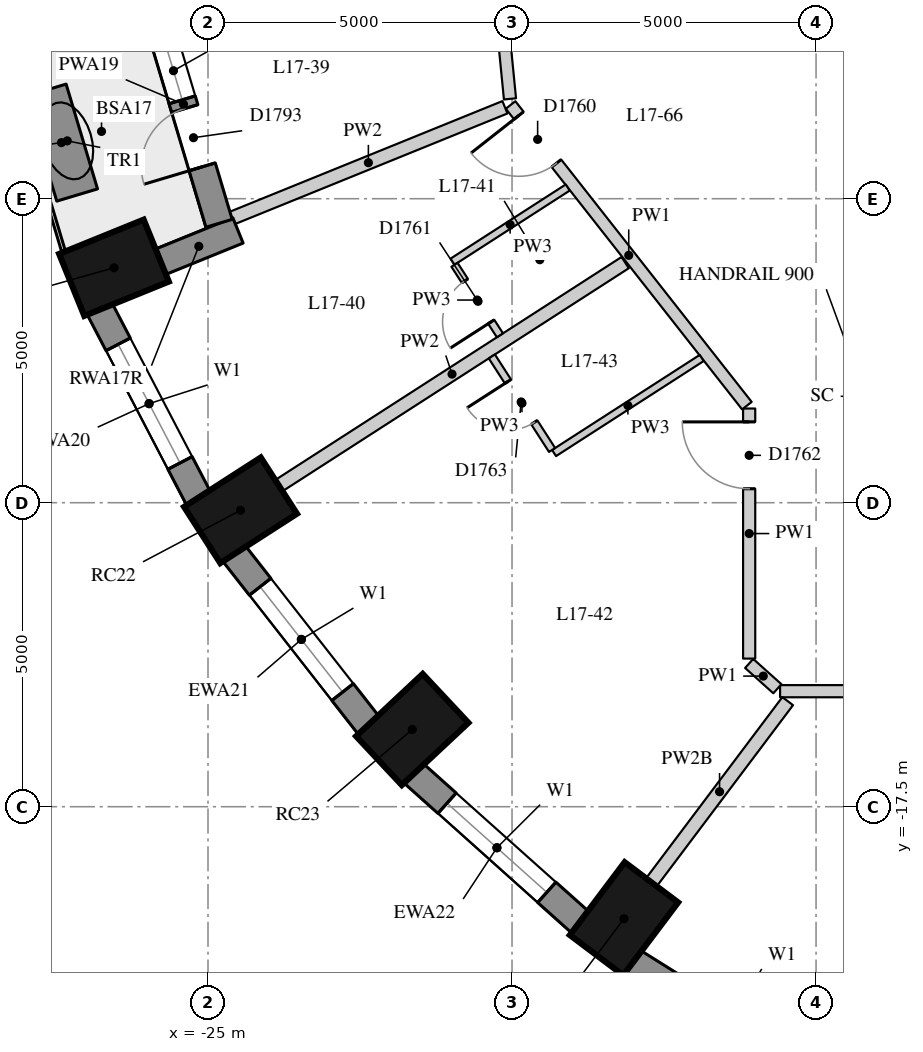
"""IFC4 building model, lengths in metres.
Left out: names, types, materials, properties, quantities, classifications, styles, units other than length and angle.
Written with IfcOpenShell. Run it as: python <this file> out.ifc"""

import sys

from ifc_helpers import new_model, si_unit, direction, frame, frame_2d, origin, origin_2d, place, context, subcontext, project, spatial, rectangle, extrude, element, fill, save


model = new_model("IFC4")
c1 = context("Model", 3, precision=1e-05, world=origin(), true_north=direction((0.0, 1.0)))
c2 = subcontext(c1, "Body", "Model", "MODEL_VIEW")
j1 = project(units=[si_unit("LENGTHUNIT", "METRE"), si_unit("PLANEANGLEUNIT", "RADIAN")], contexts=[c1])
p1 = place(None, origin())
s1 = spatial("IfcSite", under=j1, at=p1, CompositionType="ELEMENT")
p2 = place(p1, origin())
s2 = spatial("IfcBuilding", under=s1, at=p2, CompositionType="ELEMENT")
p3 = place(p2, frame((0.0, 0.0, 64.6)))
s3 = spatial("IfcBuildingStorey", under=s2, at=p3, CompositionType="ELEMENT", Elevation=64.6)
for number, where, z_axis, x_axis in (
    (1, (-26.546, -8.636, 0.0), (0.0, 0.0, 1.0), (-0.927, -0.376, 0.0)),
    (2, (-24.465, -12.625, 0.0), (0.0, 0.0, 1.0), (-0.841, -0.541, 0.0)),
    (3, (-21.641, -16.23, 0.0), (0.0, 0.0, 1.0), (-0.73, -0.683, 0.0)),
    (4, (-18.159, -19.343, 0.0), (0.0, 0.0, 1.0), (-0.601, -0.799, 0.0)),
):
    element("IfcColumn", number, at=place(p3, frame(where, z_axis=z_axis, x_axis=x_axis)), inside=s3, PredefinedType="COLUMN", context=c2, shape_type="SweptSolid", body=[
        extrude(rectangle(XDim=1.5, YDim=1.1, at=origin_2d()), origin(), (0.0, 0.0, 1.0), 3.3),
    ])
p4 = place(p3, frame((-26.786, -9.305, 0.0), z_axis=(0.0, 0.0, 1.0), x_axis=(0.462492775226, -0.886623050041, 0.0)))
e5 = element("IfcWall", 5, at=p4, inside=s3, PredefinedType="SOLIDWALL", context=c2, shape_type="SweptSolid", body=[
    extrude(rectangle(XDim=3.532, YDim=0.45, at=frame_2d((1.766, 0.0))), origin(), (0.0, 0.0, 1.0), 3.02),
])
p5 = place(p4, frame((0.666, 0.0, 0.4)))
e6 = element("IfcOpeningElement", 6, at=p5, cuts=e5, PredefinedType="OPENING", context=c2, shape_type="SweptSolid", body=[
    extrude(rectangle(XDim=2.2, YDim=1.75, at=frame_2d((1.1, 0.875))), frame((0.0, 0.235, 0.0), z_axis=(0.0, -1.0, 0.0), x_axis=(1.0, 0.0, 0.0)), (0.0, 0.0, 1.0), 0.47),
])
p6 = place(p3, frame((-24.578, -13.328, 0.0), z_axis=(0.0, 0.0, 1.0), x_axis=(0.616661975264, -0.787228053529, 0.0)))
e7 = element("IfcWall", 7, at=p6, inside=s3, PredefinedType="SOLIDWALL", context=c2, shape_type="SweptSolid", body=[
    extrude(rectangle(XDim=3.61, YDim=0.45, at=frame_2d((1.805, 0.0))), origin(), (0.0, 0.0, 1.0), 3.02),
])
p7 = place(p6, frame((0.705, 0.0, 0.4)))
e8 = element("IfcOpeningElement", 8, at=p7, cuts=e7, PredefinedType="OPENING", context=c2, shape_type="SweptSolid", body=[
    extrude(rectangle(XDim=2.2, YDim=1.75, at=frame_2d((1.1, 0.875))), frame((0.0, 0.235, 0.0), z_axis=(0.0, -1.0, 0.0), x_axis=(1.0, 0.0, 0.0)), (0.0, 0.0, 1.0), 0.47),
])
p8 = place(p3, frame((-21.627, -16.943, 0.0), z_axis=(0.0, 0.0, 1.0), x_axis=(0.745526233716, -0.66647628228, 0.0)))
e9 = element("IfcWall", 9, at=p8, inside=s3, PredefinedType="SOLIDWALL", context=c2, shape_type="SweptSolid", body=[
    extrude(rectangle(XDim=3.697, YDim=0.45, at=frame_2d((1.848, 0.0))), origin(), (0.0, 0.0, 1.0), 3.02),
])
p9 = place(p8, frame((0.749, 0.0, 0.4)))
e10 = element("IfcOpeningElement", 10, at=p9, cuts=e9, PredefinedType="OPENING", context=c2, shape_type="SweptSolid", body=[
    extrude(rectangle(XDim=2.2, YDim=1.75, at=frame_2d((1.1, 0.875))), frame((0.0, 0.235, 0.0), z_axis=(0.0, -1.0, 0.0), x_axis=(1.0, 0.0, 0.0)), (0.0, 0.0, 1.0), 0.47),
])
p10 = place(p3, frame((-18.023, -20.044, 0.0), z_axis=(0.0, 0.0, 1.0), x_axis=(0.847635480093, -0.530579016629, 0.0)))
e11 = element("IfcWall", 11, at=p10, inside=s3, PredefinedType="SOLIDWALL", context=c2, shape_type="SweptSolid", body=[
    extrude(rectangle(XDim=3.782, YDim=0.45, at=frame_2d((1.891, 0.0))), origin(), (0.0, 0.0, 1.0), 3.02),
])
p11 = place(p10, frame((0.791, 0.0, 0.4)))
e12 = element("IfcOpeningElement", 12, at=p11, cuts=e11, PredefinedType="OPENING", context=c2, shape_type="SweptSolid", body=[
    extrude(rectangle(XDim=2.2, YDim=1.75, at=frame_2d((1.1, 0.875))), frame((0.0, 0.235, 0.0), z_axis=(0.0, -1.0, 0.0), x_axis=(1.0, 0.0, 0.0)), (0.0, 0.0, 1.0), 0.47),
])
p12 = place(p3, frame((-25.796, -8.544, 0.0), z_axis=(0.0, 0.0, 1.0), x_axis=(0.926575599743, 0.376108572039, 0.0)))
e13 = element("IfcWall", 13, at=p12, inside=s3, PredefinedType="SOLIDWALL", context=c2, shape_type="SweptSolid", body=[
    extrude(rectangle(XDim=1.39, YDim=0.45, at=frame_2d((0.695, 0.0))), origin(), (0.0, 0.0, 1.0), 3.02),
])
p13 = place(p3, frame((-25.989, -3.987, 0.0), z_axis=(0.0, 0.0, 1.0), x_axis=(0.286427456555, -0.958101932015, 0.0)))
e14 = element("IfcWall", 14, at=p13, inside=s3, PredefinedType="SOLIDWALL", context=c2, shape_type="SweptSolid", body=[
    extrude(rectangle(XDim=4.089, YDim=0.45, at=frame_2d((2.044, 0.0))), origin(), (0.0, 0.0, 1.0), 3.02),
])
p14 = place(p13, frame((0.969, 0.0, 0.4)))
e15 = element("IfcOpeningElement", 15, at=p14, cuts=e14, PredefinedType="OPENING", context=c2, shape_type="SweptSolid", body=[
    extrude(rectangle(XDim=1.0, YDim=1.75, at=frame_2d((0.5, 0.875))), frame((0.0, 0.235, 0.0), z_axis=(0.0, -1.0, 0.0), x_axis=(1.0, 0.0, 0.0)), (0.0, 0.0, 1.0), 0.47),
])
p15 = place(p13, frame((2.119, 0.0, 0.0)))
e16 = element("IfcOpeningElement", 16, at=p15, cuts=e14, PredefinedType="OPENING", context=c2, shape_type="SweptSolid", body=[
    extrude(rectangle(XDim=1.0, YDim=2.15, at=frame_2d((0.5, 1.075))), frame((0.0, 0.235, 0.0), z_axis=(0.0, -1.0, 0.0), x_axis=(1.0, 0.0, 0.0)), (0.0, 0.0, 1.0), 0.47),
])
p16 = place(p3, frame((-27.669, -5.715, 0.0), z_axis=(0.0, 0.0, 1.0), x_axis=(0.287024312863, -0.957923297465, 0.0)))
e17 = element("IfcWall", 17, at=p16, inside=s3, PredefinedType="USERDEFINED", context=c2, shape_type="SweptSolid", body=[
    extrude(rectangle(XDim=1.8, YDim=0.7, at=frame_2d((0.9, 0.0))), origin(), (0.0, 0.0, 1.0), 0.75),
])
p17 = place(p3, frame((-10.282, -15.6, 0.0), z_axis=(0.0, 0.0, 1.0), x_axis=(-1.0, 0.0, 0.0)))
e18 = element("IfcWall", 18, at=p17, inside=s3, PredefinedType="PARTITIONING", context=c2, shape_type="SweptSolid", body=[
    extrude(rectangle(XDim=5.309, YDim=0.2, at=frame_2d((2.655, 0.0))), origin(), (0.0, 0.0, 1.0), 3.02),
])
p18 = place(p17, frame((0.22, 0.0, 0.0)))
e19 = element("IfcOpeningElement", 19, at=p18, cuts=e18, PredefinedType="OPENING", context=c2, shape_type="SweptSolid", body=[
    extrude(rectangle(XDim=1.1, YDim=2.1, at=frame_2d((0.55, 1.05))), frame((0.0, 0.11, 0.0), z_axis=(0.0, -1.0, 0.0), x_axis=(1.0, 0.0, 0.0)), (0.0, 0.0, 1.0), 0.22),
])
p19 = place(p3, frame((-15.636, -15.56, 0.0), z_axis=(0.0, 0.0, 1.0), x_axis=(-0.744656758283, 0.667447610187, 0.0)))
e20 = element("IfcWall", 20, at=p19, inside=s3, PredefinedType="PARTITIONING", context=c2, shape_type="SweptSolid", body=[
    extrude(rectangle(XDim=0.623, YDim=0.2, at=frame_2d((0.312, 0.0))), origin(), (0.0, 0.0, 1.0), 3.02),
])
p20 = place(p3, frame((-16.1, -15.064, 0.0), z_axis=(0.0, 0.0, 1.0), x_axis=(0.0, 1.0, 0.0)))
e21 = element("IfcWall", 21, at=p20, inside=s3, PredefinedType="PARTITIONING", context=c2, shape_type="SweptSolid", body=[
    extrude(rectangle(XDim=4.113, YDim=0.2, at=frame_2d((2.057, 0.0))), origin(), (0.0, 0.0, 1.0), 3.02),
])
p21 = place(p20, frame((2.793, 0.0, 0.0)))
e22 = element("IfcOpeningElement", 22, at=p21, cuts=e21, PredefinedType="OPENING", context=c2, shape_type="SweptSolid", body=[
    extrude(rectangle(XDim=1.1, YDim=2.1, at=frame_2d((0.55, 1.05))), frame((0.0, 0.11, 0.0), z_axis=(0.0, -1.0, 0.0), x_axis=(1.0, 0.0, 0.0)), (0.0, 0.0, 1.0), 0.22),
])
p22 = place(p3, frame((-16.137, -10.904, 0.0), z_axis=(0.0, 0.0, 1.0), x_axis=(-0.617888403737, 0.786265807808, 0.0)))
e23 = element("IfcWall", 23, at=p22, inside=s3, PredefinedType="PARTITIONING", context=c2, shape_type="SweptSolid", body=[
    extrude(rectangle(XDim=6.29, YDim=0.2, at=frame_2d((3.145, 0.0))), origin(), (0.0, 0.0, 1.0), 3.02),
])
p23 = place(p22, frame((5.07, 0.0, 0.0)))
e24 = element("IfcOpeningElement", 24, at=p23, cuts=e23, PredefinedType="OPENING", context=c2, shape_type="SweptSolid", body=[
    extrude(rectangle(XDim=1.0, YDim=2.1, at=frame_2d((0.5, 1.05))), frame((0.0, 0.11, 0.0), z_axis=(0.0, -1.0, 0.0), x_axis=(1.0, 0.0, 0.0)), (0.0, 0.0, 1.0), 0.22),
])
p24 = place(p3, frame((-20.034, -5.858, 0.0), z_axis=(0.0, 0.0, 1.0), x_axis=(-0.097894942705, 0.995196754513, 0.0)))
e25 = element("IfcWall", 25, at=p24, inside=s3, PredefinedType="PARTITIONING", context=c2, shape_type="SweptSolid", body=[
    extrude(rectangle(XDim=8.911, YDim=0.2, at=frame_2d((4.455, 0.0))), origin(), (0.0, 0.0, 1.0), 3.02),
])
p25 = place(p24, frame((5.565, 0.0, 0.0)))
e26 = element("IfcOpeningElement", 26, at=p25, cuts=e25, PredefinedType="OPENING", context=c2, shape_type="SweptSolid", body=[
    extrude(rectangle(XDim=1.1, YDim=2.1, at=frame_2d((0.55, 1.05))), frame((0.0, 0.11, 0.0), z_axis=(0.0, -1.0, 0.0), x_axis=(1.0, 0.0, 0.0)), (0.0, 0.0, 1.0), 0.22),
])
p26 = place(p24, frame((1.044, 0.0, 0.0)))
e27 = element("IfcOpeningElement", 27, at=p26, cuts=e25, PredefinedType="OPENING", context=c2, shape_type="SweptSolid", body=[
    extrude(rectangle(XDim=0.9, YDim=2.1, at=frame_2d((0.45, 1.05))), frame((0.0, 0.11, 0.0), z_axis=(0.0, -1.0, 0.0), x_axis=(1.0, 0.0, 0.0)), (0.0, 0.0, 1.0), 0.22),
])
p27 = place(p3, frame((-24.608, -7.82, 0.0), z_axis=(0.0, 0.0, 1.0), x_axis=(0.92655764882, 0.376152792643, 0.0)))
e28 = element("IfcWall", 28, at=p27, inside=s3, PredefinedType="PARTITIONING", context=c2, shape_type="SweptSolid", body=[
    extrude(rectangle(XDim=4.848, YDim=0.22, at=frame_2d((2.424, 0.0))), origin(), (0.0, 0.0, 1.0), 3.02),
])
p28 = place(p3, frame((-23.835, -12.219, 0.0), z_axis=(0.0, 0.0, 1.0), x_axis=(0.840749666863, 0.541424046076, 0.0)))
e29 = element("IfcWall", 29, at=p28, inside=s3, PredefinedType="PARTITIONING", context=c2, shape_type="SweptSolid", body=[
    extrude(rectangle(XDim=6.775, YDim=0.22, at=frame_2d((3.387, 0.0))), origin(), (0.0, 0.0, 1.0), 3.02),
])
p29 = place(p3, frame((-17.708, -18.743, 0.0), z_axis=(0.0, 0.0, 1.0), x_axis=(0.601172757903, 0.799119086967, 0.0)))
e30 = element("IfcWall", 30, at=p29, inside=s3, PredefinedType="PARTITIONING", context=c2, shape_type="SweptSolid", body=[
    extrude(rectangle(XDim=3.729, YDim=0.22, at=frame_2d((1.864, 0.0))), origin(), (0.0, 0.0, 1.0), 2.57),
])
p30 = place(p3, frame((-19.084, -7.316, 0.0), z_axis=(0.0, 0.0, 1.0), x_axis=(-0.840762836723, -0.54140359473, 0.0)))
e31 = element("IfcWall", 31, at=p30, inside=s3, PredefinedType="PARTITIONING", context=c2, shape_type="SweptSolid", body=[
    extrude(rectangle(XDim=2.253, YDim=0.12, at=frame_2d((1.127, 0.0))), origin(), (0.0, 0.0, 1.0), 3.02),
])
p31 = place(p3, frame((-16.881, -10.12, 0.0), z_axis=(0.0, 0.0, 1.0), x_axis=(-0.840749755927, -0.541423907773, 0.0)))
e32 = element("IfcWall", 32, at=p31, inside=s3, PredefinedType="PARTITIONING", context=c2, shape_type="SweptSolid", body=[
    extrude(rectangle(XDim=2.888, YDim=0.12, at=frame_2d((1.444, 0.0))), origin(), (0.0, 0.0, 1.0), 3.02),
])
p32 = place(p3, frame((-20.946, -8.587, 0.0), z_axis=(0.0, 0.0, 1.0), x_axis=(0.541526323973, -0.840683793375, 0.0)))
e33 = element("IfcWall", 33, at=p32, inside=s3, PredefinedType="PARTITIONING", context=c2, shape_type="SweptSolid", body=[
    extrude(rectangle(XDim=1.38, YDim=0.12, at=frame_2d((0.69, 0.0))), origin(), (0.0, 0.0, 1.0), 3.02),
])
p33 = place(p32, frame((0.315, 0.0, 0.0)))
e34 = element("IfcOpeningElement", 34, at=p33, cuts=e33, PredefinedType="OPENING", context=c2, shape_type="SweptSolid", body=[
    extrude(rectangle(XDim=0.8, YDim=2.1, at=frame_2d((0.4, 1.05))), frame((0.0, 0.07, 0.0), z_axis=(0.0, -1.0, 0.0), x_axis=(1.0, 0.0, 0.0)), (0.0, 0.0, 1.0), 0.14),
])
p34 = place(p3, frame((-19.341, -11.633, 0.0), z_axis=(0.0, 0.0, 1.0), x_axis=(-0.541391271501, 0.840770772055, 0.0)))
e35 = element("IfcWall", 35, at=p34, inside=s3, PredefinedType="PARTITIONING", context=c2, shape_type="SweptSolid", body=[
    extrude(rectangle(XDim=1.83, YDim=0.12, at=frame_2d((0.915, 0.0))), origin(), (0.0, 0.0, 1.0), 3.02),
])
p35 = place(p34, frame((0.54, 0.0, 0.0)))
e36 = element("IfcOpeningElement", 36, at=p35, cuts=e35, PredefinedType="OPENING", context=c2, shape_type="SweptSolid", body=[
    extrude(rectangle(XDim=0.8, YDim=2.1, at=frame_2d((0.4, 1.05))), frame((0.0, 0.07, 0.0), z_axis=(0.0, -1.0, 0.0), x_axis=(1.0, 0.0, 0.0)), (0.0, 0.0, 1.0), 0.14),
])
p36 = place(p5, origin())
e37 = element("IfcWindow", 37, at=p36, inside=s3, PartitioningType="SINGLE_PANEL", PredefinedType="WINDOW", context=c2, shape_type="SweptSolid", body=[
    extrude(rectangle(XDim=2.2, YDim=1.75, at=frame_2d((1.1, 0.875))), frame((0.0, 0.035, 0.0), z_axis=(0.0, -1.0, 0.0), x_axis=(1.0, 0.0, 0.0)), (0.0, 0.0, 1.0), 0.06),
])
fill(e6, e37)
p37 = place(p7, origin())
e38 = element("IfcWindow", 38, at=p37, inside=s3, PartitioningType="SINGLE_PANEL", PredefinedType="WINDOW", context=c2, shape_type="SweptSolid", body=[
    extrude(rectangle(XDim=2.2, YDim=1.75, at=frame_2d((1.1, 0.875))), frame((0.0, 0.035, 0.0), z_axis=(0.0, -1.0, 0.0), x_axis=(1.0, 0.0, 0.0)), (0.0, 0.0, 1.0), 0.06),
])
fill(e8, e38)
p38 = place(p9, origin())
e39 = element("IfcWindow", 39, at=p38, inside=s3, PartitioningType="SINGLE_PANEL", PredefinedType="WINDOW", context=c2, shape_type="SweptSolid", body=[
    extrude(rectangle(XDim=2.2, YDim=1.75, at=frame_2d((1.1, 0.875))), frame((0.0, 0.035, 0.0), z_axis=(0.0, -1.0, 0.0), x_axis=(1.0, 0.0, 0.0)), (0.0, 0.0, 1.0), 0.06),
])
fill(e10, e39)
p39 = place(p14, origin())
e40 = element("IfcWindow", 40, at=p39, inside=s3, PartitioningType="SINGLE_PANEL", PredefinedType="WINDOW", context=c2, shape_type="SweptSolid", body=[
    extrude(rectangle(XDim=1.0, YDim=1.75, at=frame_2d((0.5, 0.875))), frame((0.0, 0.035, 0.0), z_axis=(0.0, -1.0, 0.0), x_axis=(1.0, 0.0, 0.0)), (0.0, 0.0, 1.0), 0.06),
])
fill(e15, e40)
p40 = place(p15, frame((1.0, 0.0, 0.0), z_axis=(0.0, 0.0, 1.0), x_axis=(-1.0, 0.0, 0.0)))
e41 = element("IfcDoor", 41, at=p40, inside=s3, OperationType="SINGLE_SWING_LEFT", PredefinedType="DOOR", context=c2, shape_type="SweptSolid", body=[
    extrude(rectangle(XDim=1.0, YDim=2.15, at=frame_2d((0.5, 1.075))), frame((0.0, 0.075, 0.0), z_axis=(0.0, -1.0, 0.0), x_axis=(1.0, 0.0, 0.0)), (0.0, 0.0, 1.0), 0.05),
])
fill(e16, e41)
p41 = place(p23, origin())
e42 = element("IfcDoor", 42, at=p41, inside=s3, OperationType="SINGLE_SWING_RIGHT", PredefinedType="DOOR", context=c2, shape_type="SweptSolid", body=[
    extrude(rectangle(XDim=1.0, YDim=2.1, at=frame_2d((0.5, 1.05))), frame((0.0, 0.025, 0.0), z_axis=(0.0, -1.0, 0.0), x_axis=(1.0, 0.0, 0.0)), (0.0, 0.0, 1.0), 0.05),
])
fill(e24, e42)
p42 = place(p33, origin())
e43 = element("IfcDoor", 43, at=p42, inside=s3, OperationType="SINGLE_SWING_LEFT", PredefinedType="DOOR", context=c2, shape_type="SweptSolid", body=[
    extrude(rectangle(XDim=0.8, YDim=2.1, at=frame_2d((0.4, 1.05))), frame((0.0, 0.025, 0.0), z_axis=(0.0, -1.0, 0.0), x_axis=(1.0, 0.0, 0.0)), (0.0, 0.0, 1.0), 0.05),
])
fill(e34, e43)
p43 = place(p21, origin())
e44 = element("IfcDoor", 44, at=p43, inside=s3, OperationType="SINGLE_SWING_RIGHT", PredefinedType="DOOR", context=c2, shape_type="SweptSolid", body=[
    extrude(rectangle(XDim=1.1, YDim=2.1, at=frame_2d((0.55, 1.05))), frame((0.0, 0.025, 0.0), z_axis=(0.0, -1.0, 0.0), x_axis=(1.0, 0.0, 0.0)), (0.0, 0.0, 1.0), 0.05),
])
fill(e22, e44)
p44 = place(p35, origin())
e45 = element("IfcDoor", 45, at=p44, inside=s3, OperationType="SINGLE_SWING_RIGHT", PredefinedType="DOOR", context=c2, shape_type="SweptSolid", body=[
    extrude(rectangle(XDim=0.8, YDim=2.1, at=frame_2d((0.4, 1.05))), frame((0.0, 0.025, 0.0), z_axis=(0.0, -1.0, 0.0), x_axis=(1.0, 0.0, 0.0)), (0.0, 0.0, 1.0), 0.05),
])
fill(e36, e45)
save(model, sys.argv[1])
